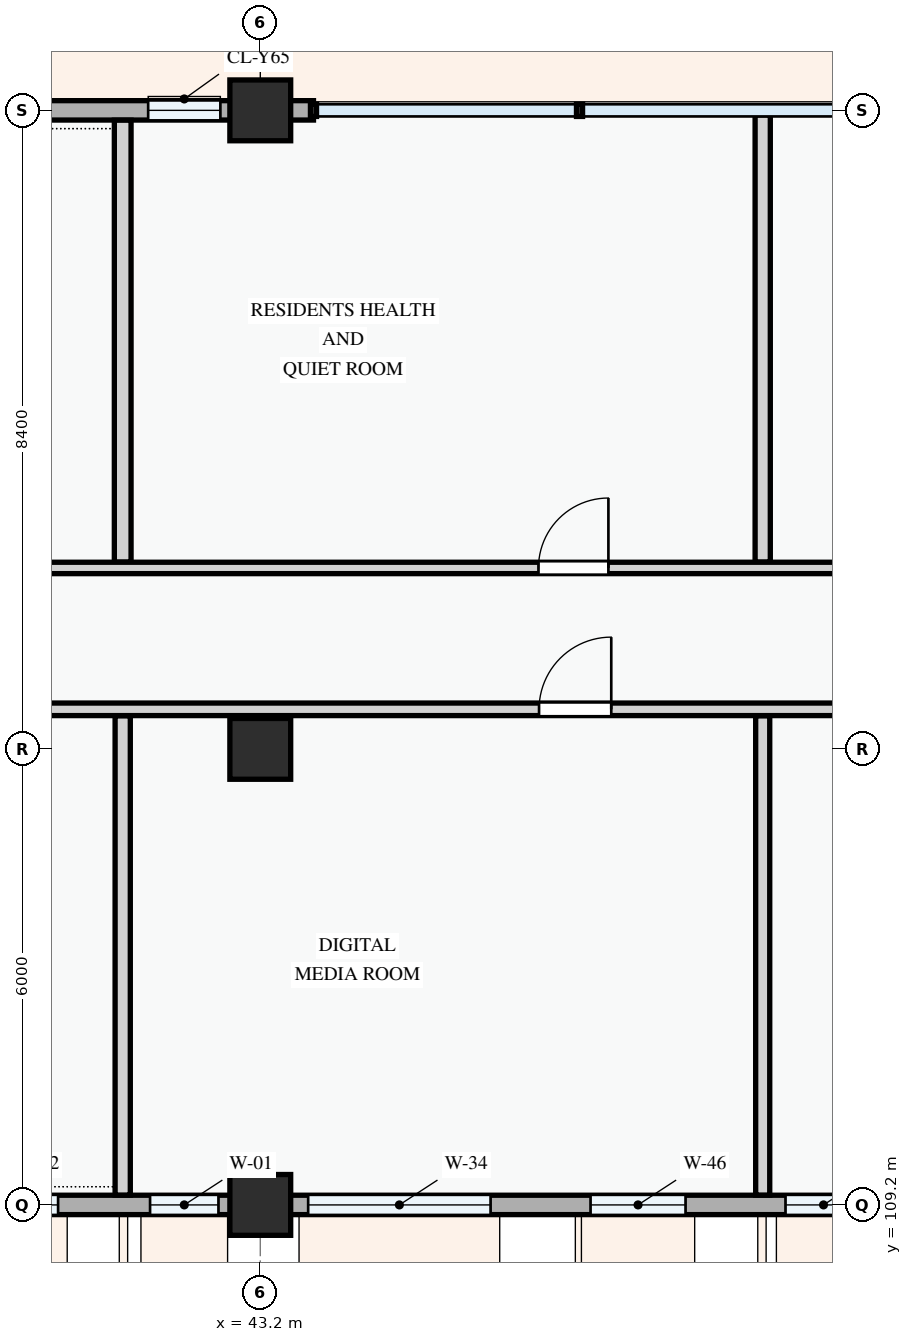
"""IFC4 building model, lengths in metres.
Left out: names, types, materials, properties, quantities, classifications, styles, units other than length and angle.
Written with IfcOpenShell. Run it as: python <this file> out.ifc"""

import sys

from ifc_helpers import new_model, si_unit, direction, frame, frame_2d, origin, origin_2d, place, context, subcontext, project, spatial, rectangle, extrude, element, fill, save


model = new_model("IFC4")
c1 = context("Model", 3, precision=1e-05, world=origin(), true_north=direction((0.0, 1.0)))
c2 = subcontext(c1, "Body", "Model", "MODEL_VIEW")
j1 = project(units=[si_unit("LENGTHUNIT", "METRE"), si_unit("PLANEANGLEUNIT", "RADIAN")], contexts=[c1])
p1 = place(None, origin())
s1 = spatial("IfcSite", under=j1, at=p1, CompositionType="ELEMENT")
p2 = place(p1, origin())
s2 = spatial("IfcBuilding", under=s1, at=p2, CompositionType="ELEMENT")
p3 = place(p2, frame((0.0, 0.0, 4.5)))
s3 = spatial("IfcBuildingStorey", under=s2, at=p3, CompositionType="ELEMENT", Elevation=4.5)
for number, where, z_axis, x_axis in (
    (1, (43.2, 109.2, 0.0), (0.0, 0.0, 1.0), (1.0, 0.0, 0.0)),
    (2, (43.2, 115.2, 0.0), (0.0, 0.0, 1.0), (1.0, 0.0, 0.0)),
    (3, (43.2, 123.6, 0.0), (0.0, 0.0, 1.0), (1.0, 0.0, 0.0)),
):
    element("IfcColumn", number, at=place(p3, frame(where, z_axis=z_axis, x_axis=x_axis)), inside=s3, PredefinedType="COLUMN", context=c2, shape_type="SweptSolid", body=[
        extrude(rectangle(XDim=0.8, YDim=0.8, at=origin_2d()), origin(), (0.0, 0.0, 1.0), 3.6),
    ])
p4 = place(p3, frame((37.2, 109.2, 0.0), z_axis=(0.0, 0.0, 1.0), x_axis=(1.0, 0.0, 0.0)))
e4 = element("IfcWall", 4, at=p4, inside=s3, PredefinedType="STANDARD", context=c2, shape_type="SweptSolid", body=[
    extrude(rectangle(XDim=6.0, YDim=0.255, at=frame_2d((3.0, 0.0))), origin(), (0.0, 0.0, 1.0), 2.775),
])
p5 = place(p4, frame((1.04, 0.0, 0.78)))
e5 = element("IfcOpeningElement", 5, at=p5, cuts=e4, PredefinedType="OPENING", context=c2, shape_type="SweptSolid", body=[
    extrude(rectangle(XDim=2.3, YDim=1.7, at=frame_2d((1.15, 0.85))), frame((0.0, 0.137, 0.0), z_axis=(0.0, -1.0, 0.0), x_axis=(1.0, 0.0, 0.0)), (0.0, 0.0, 1.0), 0.275),
])
p6 = place(p4, frame((4.55, 0.0, 0.78)))
e6 = element("IfcOpeningElement", 6, at=p6, cuts=e4, PredefinedType="OPENING", context=c2, shape_type="SweptSolid", body=[
    extrude(rectangle(XDim=0.9, YDim=1.2, at=frame_2d((0.45, 0.6))), frame((0.0, 0.137, 0.0), z_axis=(0.0, -1.0, 0.0), x_axis=(1.0, 0.0, 0.0)), (0.0, 0.0, 1.0), 0.275),
])
p7 = place(p3, frame((43.2, 109.2, 0.0), z_axis=(0.0, 0.0, 1.0), x_axis=(1.0, 0.0, 0.0)))
e7 = element("IfcWall", 7, at=p7, inside=s3, PredefinedType="STANDARD", context=c2, shape_type="SweptSolid", body=[
    extrude(rectangle(XDim=8.4, YDim=0.255, at=frame_2d((4.2, 0.0))), origin(), (0.0, 0.0, 1.0), 2.675),
])
p8 = place(p7, frame((0.63, 0.0, 0.78)))
e8 = element("IfcOpeningElement", 8, at=p8, cuts=e7, PredefinedType="OPENING", context=c2, shape_type="SweptSolid", body=[
    extrude(rectangle(XDim=2.4, YDim=1.65, at=frame_2d((1.2, 0.825))), frame((0.0, 0.137, 0.0), z_axis=(0.0, -1.0, 0.0), x_axis=(1.0, 0.0, 0.0)), (0.0, 0.0, 1.0), 0.275),
])
p9 = place(p7, frame((4.345, 0.0, 0.78)))
e9 = element("IfcOpeningElement", 9, at=p9, cuts=e7, PredefinedType="OPENING", context=c2, shape_type="SweptSolid", body=[
    extrude(rectangle(XDim=1.25, YDim=1.3, at=frame_2d((0.625, 0.65))), frame((0.0, 0.137, 0.0), z_axis=(0.0, -1.0, 0.0), x_axis=(1.0, 0.0, 0.0)), (0.0, 0.0, 1.0), 0.275),
])
p10 = place(p7, frame((6.91, 0.0, 0.78)))
e10 = element("IfcOpeningElement", 10, at=p10, cuts=e7, PredefinedType="OPENING", context=c2, shape_type="SweptSolid", body=[
    extrude(rectangle(XDim=1.0, YDim=1.25, at=frame_2d((0.5, 0.625))), frame((0.0, 0.137, 0.0), z_axis=(0.0, -1.0, 0.0), x_axis=(1.0, 0.0, 0.0)), (0.0, 0.0, 1.0), 0.275),
])
p11 = place(p3, frame((43.9, 123.6, 0.0), z_axis=(0.0, 0.0, 1.0), x_axis=(-1.0, 0.0, 0.0)))
e11 = element("IfcWall", 11, at=p11, inside=s3, PredefinedType="STANDARD", context=c2, shape_type="SweptSolid", body=[
    extrude(rectangle(XDim=0.7, YDim=0.255, at=frame_2d((0.35, 0.0))), origin(), (0.0, 0.0, 1.0), 2.675),
])
p12 = place(p3, frame((43.2, 123.6, 0.0), z_axis=(0.0, 0.0, 1.0), x_axis=(-1.0, 0.0, 0.0)))
e12 = element("IfcWall", 12, at=p12, inside=s3, PredefinedType="STANDARD", context=c2, shape_type="SweptSolid", body=[
    extrude(rectangle(XDim=6.0, YDim=0.255, at=frame_2d((3.0, 0.0))), origin(), (0.0, 0.0, 1.0), 2.775),
])
p13 = place(p12, frame((0.525, 0.0, 0.78)))
e13 = element("IfcOpeningElement", 13, at=p13, cuts=e12, PredefinedType="OPENING", context=c2, shape_type="SweptSolid", body=[
    extrude(rectangle(XDim=0.95, YDim=1.15, at=frame_2d((0.475, 0.575))), frame((0.0, 0.137, 0.0), z_axis=(0.0, -1.0, 0.0), x_axis=(1.0, 0.0, 0.0)), (0.0, 0.0, 1.0), 0.275),
])
p14 = place(p12, frame((3.185, 0.0, 0.78)))
e14 = element("IfcOpeningElement", 14, at=p14, cuts=e12, PredefinedType="OPENING", context=c2, shape_type="SweptSolid", body=[
    extrude(rectangle(XDim=1.25, YDim=1.45, at=frame_2d((0.625, 0.725))), frame((0.0, 0.137, 0.0), z_axis=(0.0, -1.0, 0.0), x_axis=(1.0, 0.0, 0.0)), (0.0, 0.0, 1.0), 0.275),
])
p15 = place(p3, frame((41.39, 109.33, 0.0), z_axis=(0.0, 0.0, 1.0), x_axis=(0.0, 1.0, 0.0)))
e15 = element("IfcWall", 15, at=p15, inside=s3, PredefinedType="PARTITIONING", context=c2, shape_type="SweptSolid", body=[
    extrude(rectangle(XDim=6.306, YDim=0.2, at=frame_2d((3.153, 0.0))), origin(), (0.0, 0.0, 1.0), 3.3),
])
p16 = place(p3, frame((41.39, 117.657, 0.0), z_axis=(0.0, 0.0, 1.0), x_axis=(0.0, 1.0, 0.0)))
e16 = element("IfcWall", 16, at=p16, inside=s3, PredefinedType="PARTITIONING", context=c2, shape_type="SweptSolid", body=[
    extrude(rectangle(XDim=5.813, YDim=0.22, at=frame_2d((2.907, 0.0))), origin(), (0.0, 0.0, 1.0), 3.3),
])
p17 = place(p3, frame((49.81, 109.33, 0.0), z_axis=(0.0, 0.0, 1.0), x_axis=(0.0, 1.0, 0.0)))
e17 = element("IfcWall", 17, at=p17, inside=s3, PredefinedType="PARTITIONING", context=c2, shape_type="SweptSolid", body=[
    extrude(rectangle(XDim=6.306, YDim=0.185, at=frame_2d((3.153, 0.0))), origin(), (0.0, 0.0, 1.0), 3.3),
])
p18 = place(p3, frame((49.81, 117.657, 0.0), z_axis=(0.0, 0.0, 1.0), x_axis=(0.0, 1.0, 0.0)))
e18 = element("IfcWall", 18, at=p18, inside=s3, PredefinedType="PARTITIONING", context=c2, shape_type="SweptSolid", body=[
    extrude(rectangle(XDim=5.883, YDim=0.2, at=frame_2d((2.941, 0.0))), origin(), (0.0, 0.0, 1.0), 3.3),
])
p19 = place(p3, frame((25.15, 115.72, 0.0), z_axis=(0.0, 0.0, 1.0), x_axis=(1.0, 0.0, 0.0)))
e19 = element("IfcWall", 19, at=p19, inside=s3, PredefinedType="PARTITIONING", context=c2, shape_type="SweptSolid", body=[
    extrude(rectangle(XDim=32.321, YDim=0.165, at=frame_2d((16.16, 0.0))), origin(), (0.0, 0.0, 1.0), 3.3),
])
p20 = place(p19, frame((6.9, 0.0, 0.0)))
e20 = element("IfcOpeningElement", 20, at=p20, cuts=e19, PredefinedType="OPENING", context=c2, shape_type="SweptSolid", body=[
    extrude(rectangle(XDim=0.95, YDim=2.1, at=frame_2d((0.475, 1.05))), frame((0.0, 0.093, 0.0), z_axis=(0.0, -1.0, 0.0), x_axis=(1.0, 0.0, 0.0)), (0.0, 0.0, 1.0), 0.185),
])
p21 = place(p19, frame((8.35, 0.0, 0.0)))
e21 = element("IfcOpeningElement", 21, at=p21, cuts=e19, PredefinedType="OPENING", context=c2, shape_type="SweptSolid", body=[
    extrude(rectangle(XDim=0.95, YDim=2.1, at=frame_2d((0.475, 1.05))), frame((0.0, 0.093, 0.0), z_axis=(0.0, -1.0, 0.0), x_axis=(1.0, 0.0, 0.0)), (0.0, 0.0, 1.0), 0.185),
])
p22 = place(p19, frame((21.718, 0.0, 0.0)))
e22 = element("IfcOpeningElement", 22, at=p22, cuts=e19, PredefinedType="OPENING", context=c2, shape_type="SweptSolid", body=[
    extrude(rectangle(XDim=0.95, YDim=2.1, at=frame_2d((0.475, 1.05))), frame((0.0, 0.093, 0.0), z_axis=(0.0, -1.0, 0.0), x_axis=(1.0, 0.0, 0.0)), (0.0, 0.0, 1.0), 0.185),
])
p23 = place(p19, frame((29.031, 0.0, 0.0)))
e23 = element("IfcOpeningElement", 23, at=p23, cuts=e19, PredefinedType="OPENING", context=c2, shape_type="SweptSolid", body=[
    extrude(rectangle(XDim=0.95, YDim=2.1, at=frame_2d((0.475, 1.05))), frame((0.0, 0.093, 0.0), z_axis=(0.0, -1.0, 0.0), x_axis=(1.0, 0.0, 0.0)), (0.0, 0.0, 1.0), 0.185),
])
p24 = place(p3, frame((22.66, 117.58, 0.0), z_axis=(0.0, 0.0, 1.0), x_axis=(1.0, 0.0, 0.0)))
e24 = element("IfcWall", 24, at=p24, inside=s3, PredefinedType="PARTITIONING", context=c2, shape_type="SweptSolid", body=[
    extrude(rectangle(XDim=34.88, YDim=0.15, at=frame_2d((17.44, 0.0))), origin(), (0.0, 0.0, 1.0), 3.3),
])
p25 = place(p24, frame((9.38, 0.0, 0.0)))
e25 = element("IfcOpeningElement", 25, at=p25, cuts=e24, PredefinedType="OPENING", context=c2, shape_type="SweptSolid", body=[
    extrude(rectangle(XDim=0.92, YDim=2.1, at=frame_2d((0.46, 1.05))), frame((0.0, 0.085, 0.0), z_axis=(0.0, -1.0, 0.0), x_axis=(1.0, 0.0, 0.0)), (0.0, 0.0, 1.0), 0.17),
])
p26 = place(p24, frame((10.84, 0.0, 0.0)))
e26 = element("IfcOpeningElement", 26, at=p26, cuts=e24, PredefinedType="OPENING", context=c2, shape_type="SweptSolid", body=[
    extrude(rectangle(XDim=0.92, YDim=2.1, at=frame_2d((0.46, 1.05))), frame((0.0, 0.085, 0.0), z_axis=(0.0, -1.0, 0.0), x_axis=(1.0, 0.0, 0.0)), (0.0, 0.0, 1.0), 0.17),
])
p27 = place(p24, frame((24.2, 0.0, 0.0)))
e27 = element("IfcOpeningElement", 27, at=p27, cuts=e24, PredefinedType="OPENING", context=c2, shape_type="SweptSolid", body=[
    extrude(rectangle(XDim=0.92, YDim=2.1, at=frame_2d((0.46, 1.05))), frame((0.0, 0.085, 0.0), z_axis=(0.0, -1.0, 0.0), x_axis=(1.0, 0.0, 0.0)), (0.0, 0.0, 1.0), 0.17),
])
p28 = place(p24, frame((31.515, 0.0, 0.0)))
e28 = element("IfcOpeningElement", 28, at=p28, cuts=e24, PredefinedType="OPENING", context=c2, shape_type="SweptSolid", body=[
    extrude(rectangle(XDim=0.92, YDim=2.1, at=frame_2d((0.46, 1.05))), frame((0.0, 0.085, 0.0), z_axis=(0.0, -1.0, 0.0), x_axis=(1.0, 0.0, 0.0)), (0.0, 0.0, 1.0), 0.17),
])
p29 = place(p5, origin())
e29 = element("IfcWindow", 29, at=p29, inside=s3, PartitioningType="DOUBLE_PANEL_VERTICAL", PredefinedType="WINDOW", context=c2, shape_type="SweptSolid", body=[
    extrude(rectangle(XDim=2.3, YDim=1.7, at=frame_2d((1.15, 0.85))), frame((0.0, 0.03, 0.0), z_axis=(0.0, -1.0, 0.0), x_axis=(1.0, 0.0, 0.0)), (0.0, 0.0, 1.0), 0.06),
])
fill(e5, e29)
p30 = place(p6, origin())
e30 = element("IfcWindow", 30, at=p30, inside=s3, PartitioningType="SINGLE_PANEL", PredefinedType="WINDOW", context=c2, shape_type="SweptSolid", body=[
    extrude(rectangle(XDim=0.9, YDim=1.2, at=frame_2d((0.45, 0.6))), frame((0.0, 0.03, 0.0), z_axis=(0.0, -1.0, 0.0), x_axis=(1.0, 0.0, 0.0)), (0.0, 0.0, 1.0), 0.06),
])
fill(e6, e30)
p31 = place(p8, origin())
e31 = element("IfcWindow", 31, at=p31, inside=s3, PartitioningType="DOUBLE_PANEL_VERTICAL", PredefinedType="WINDOW", context=c2, shape_type="SweptSolid", body=[
    extrude(rectangle(XDim=2.4, YDim=1.65, at=frame_2d((1.2, 0.825))), frame((0.0, 0.03, 0.0), z_axis=(0.0, -1.0, 0.0), x_axis=(1.0, 0.0, 0.0)), (0.0, 0.0, 1.0), 0.06),
])
fill(e8, e31)
p32 = place(p9, origin())
e32 = element("IfcWindow", 32, at=p32, inside=s3, PartitioningType="SINGLE_PANEL", PredefinedType="WINDOW", context=c2, shape_type="SweptSolid", body=[
    extrude(rectangle(XDim=1.25, YDim=1.3, at=frame_2d((0.625, 0.65))), frame((0.0, 0.03, 0.0), z_axis=(0.0, -1.0, 0.0), x_axis=(1.0, 0.0, 0.0)), (0.0, 0.0, 1.0), 0.06),
])
fill(e9, e32)
p33 = place(p10, origin())
e33 = element("IfcWindow", 33, at=p33, inside=s3, PartitioningType="SINGLE_PANEL", PredefinedType="WINDOW", context=c2, shape_type="SweptSolid", body=[
    extrude(rectangle(XDim=1.0, YDim=1.25, at=frame_2d((0.5, 0.625))), frame((0.0, 0.03, 0.0), z_axis=(0.0, -1.0, 0.0), x_axis=(1.0, 0.0, 0.0)), (0.0, 0.0, 1.0), 0.06),
])
fill(e10, e33)
p34 = place(p13, origin())
e34 = element("IfcWindow", 34, at=p34, inside=s3, PartitioningType="SINGLE_PANEL", PredefinedType="WINDOW", context=c2, shape_type="SweptSolid", body=[
    extrude(rectangle(XDim=0.95, YDim=1.15, at=frame_2d((0.475, 0.575))), frame((0.0, 0.03, 0.0), z_axis=(0.0, -1.0, 0.0), x_axis=(1.0, 0.0, 0.0)), (0.0, 0.0, 1.0), 0.06),
])
fill(e13, e34)
p35 = place(p22, origin())
e35 = element("IfcDoor", 35, at=p35, inside=s3, OperationType="SINGLE_SWING_RIGHT", PredefinedType="DOOR", context=c2, shape_type="SweptSolid", body=[
    extrude(rectangle(XDim=0.95, YDim=2.1, at=frame_2d((0.475, 1.05))), frame((0.0, 0.025, 0.0), z_axis=(0.0, -1.0, 0.0), x_axis=(1.0, 0.0, 0.0)), (0.0, 0.0, 1.0), 0.05),
])
fill(e22, e35)
p36 = place(p27, origin())
e36 = element("IfcDoor", 36, at=p36, inside=s3, OperationType="SINGLE_SWING_RIGHT", PredefinedType="DOOR", context=c2, shape_type="SweptSolid", body=[
    extrude(rectangle(XDim=0.92, YDim=2.1, at=frame_2d((0.46, 1.05))), frame((0.0, 0.025, 0.0), z_axis=(0.0, -1.0, 0.0), x_axis=(1.0, 0.0, 0.0)), (0.0, 0.0, 1.0), 0.05),
])
fill(e27, e36)
save(model, sys.argv[1])
